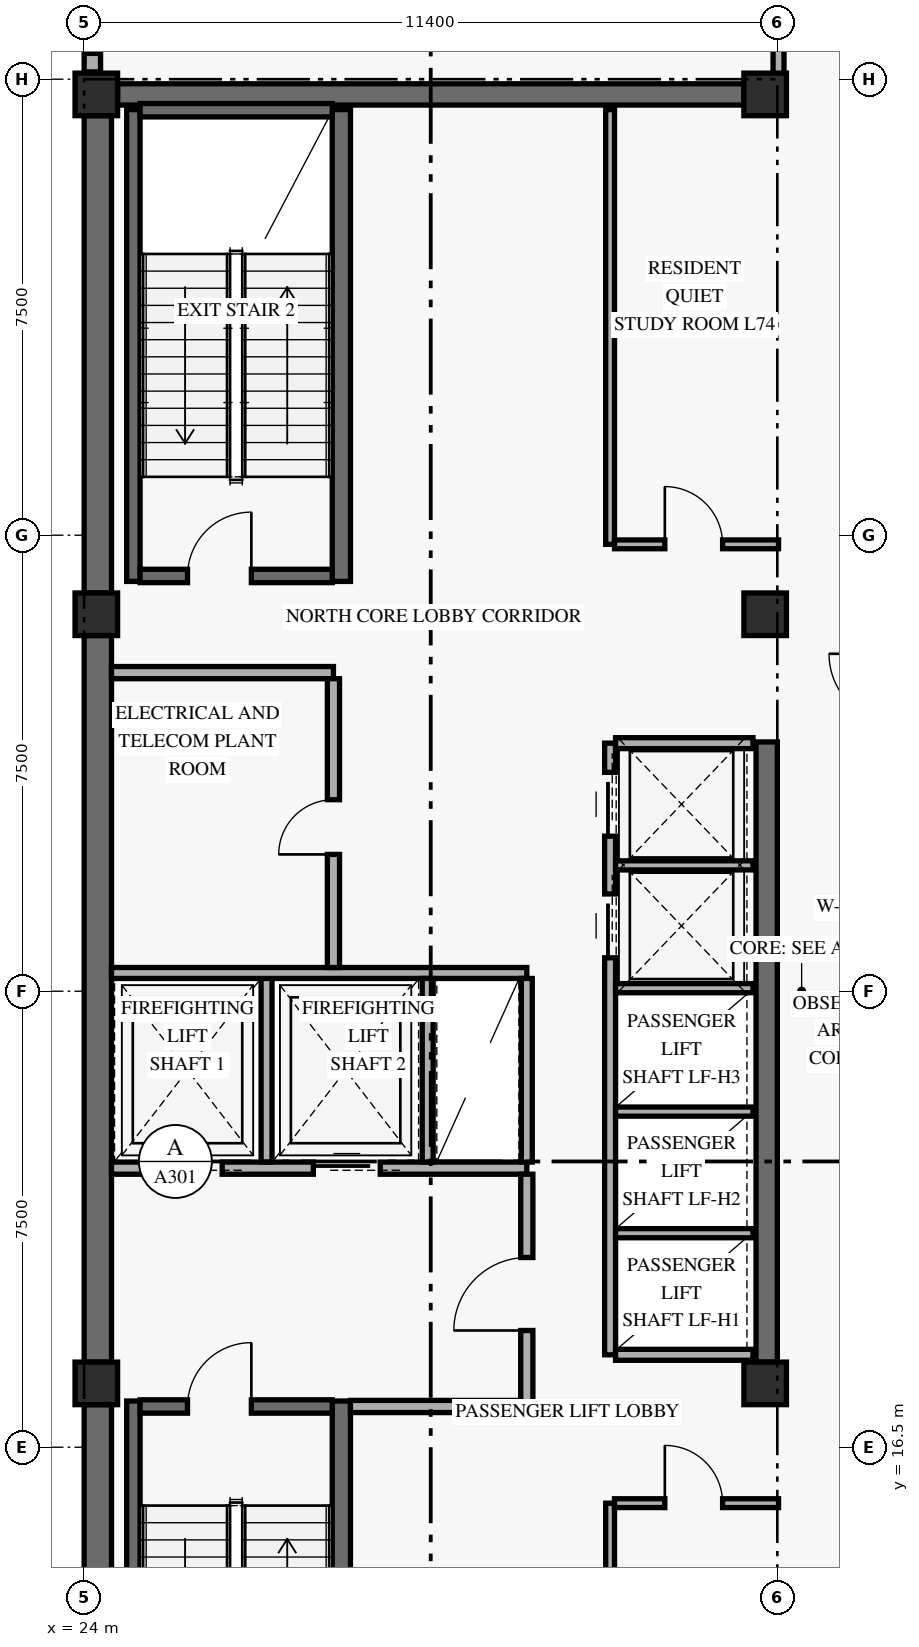
"""IFC4 building model, lengths in metres.
Left out: names, types, materials, properties, quantities, classifications, styles, units other than length and angle.
Written with IfcOpenShell. Run it as: python <this file> out.ifc"""

import sys

from ifc_helpers import new_model, si_unit, direction, frame, frame_2d, origin, origin_2d, place, context, subcontext, project, spatial, rectangle, extrude, element, fill, save


model = new_model("IFC4")
c1 = context("Model", 3, precision=1e-05, world=origin(), true_north=direction((0.0, 1.0)))
c2 = subcontext(c1, "Body", "Model", "MODEL_VIEW")
j1 = project(units=[si_unit("LENGTHUNIT", "METRE"), si_unit("PLANEANGLEUNIT", "RADIAN")], contexts=[c1])
p1 = place(None, origin())
s1 = spatial("IfcSite", under=j1, at=p1, CompositionType="ELEMENT")
p2 = place(p1, origin())
s2 = spatial("IfcBuilding", under=s1, at=p2, CompositionType="ELEMENT")
p3 = place(p2, frame((0.0, 0.0, 282.0)))
s3 = spatial("IfcBuildingStorey", under=s2, at=p3, CompositionType="ELEMENT", Elevation=282.0)
p4 = place(p3, frame((24.225, 9.6, 0.0), z_axis=(0.0, 0.0, 1.0), x_axis=(0.0, 1.0, 0.0)))
e1 = element("IfcWall", 1, at=p4, inside=s3, PredefinedType="SHEAR", context=c2, shape_type="SweptSolid", body=[
    extrude(rectangle(XDim=7.6, YDim=0.45, at=frame_2d((3.8, 0.0))), origin(), (0.0, 0.0, 1.0), 4.161),
])
p5 = place(p3, frame((24.225, 17.9, 0.0), z_axis=(0.0, 0.0, 1.0), x_axis=(0.0, 1.0, 0.0)))
e2 = element("IfcWall", 2, at=p5, inside=s3, PredefinedType="SHEAR", context=c2, shape_type="SweptSolid", body=[
    extrude(rectangle(XDim=11.95, YDim=0.45, at=frame_2d((5.975, 0.0))), origin(), (0.0, 0.0, 1.0), 4.161),
])
p6 = place(p3, frame((24.225, 30.55, 0.0), z_axis=(0.0, 0.0, 1.0), x_axis=(0.0, 1.0, 0.0)))
e3 = element("IfcWall", 3, at=p6, inside=s3, PredefinedType="SHEAR", context=c2, shape_type="SweptSolid", body=[
    extrude(rectangle(XDim=7.85, YDim=0.45, at=frame_2d((3.925, 0.0))), origin(), (0.0, 0.0, 1.0), 4.161),
])
p7 = place(p3, frame((35.225, 17.9, 0.0), z_axis=(0.0, 0.0, 1.0), x_axis=(0.0, 1.0, 0.0)))
e4 = element("IfcWall", 4, at=p7, inside=s3, PredefinedType="SHEAR", context=c2, shape_type="SweptSolid", body=[
    extrude(rectangle(XDim=10.2, YDim=0.35, at=frame_2d((5.1, 0.0))), origin(), (0.0, 0.0, 1.0), 4.161),
])
p8 = place(p3, frame((24.55, 38.75, 0.0), z_axis=(0.0, 0.0, 1.0), x_axis=(1.0, 0.0, 0.0)))
e5 = element("IfcWall", 5, at=p8, inside=s3, PredefinedType="SHEAR", context=c2, shape_type="SweptSolid", body=[
    extrude(rectangle(XDim=10.3, YDim=0.35, at=frame_2d((5.15, 0.0))), origin(), (0.0, 0.0, 1.0), 4.7),
])
p9 = place(p3, frame((24.81, 9.5, 0.0), z_axis=(0.0, 0.0, 1.0), x_axis=(0.0, 1.0, 0.0)))
e6 = element("IfcWall", 6, at=p9, inside=s3, PredefinedType="SHEAR", context=c2, shape_type="SweptSolid", body=[
    extrude(rectangle(XDim=7.76, YDim=0.22, at=frame_2d((3.88, 0.0))), origin(), (0.0, 0.0, 1.0), 4.7),
])
p10 = place(p3, frame((28.23, 9.5, 0.0), z_axis=(0.0, 0.0, 1.0), x_axis=(0.0, 1.0, 0.0)))
e7 = element("IfcWall", 7, at=p10, inside=s3, PredefinedType="SHEAR", context=c2, shape_type="SweptSolid", body=[
    extrude(rectangle(XDim=7.76, YDim=0.3, at=frame_2d((3.88, 0.0))), origin(), (0.0, 0.0, 1.0), 4.7),
])
p11 = place(p3, frame((24.92, 17.17, 0.0), z_axis=(0.0, 0.0, 1.0), x_axis=(1.0, 0.0, 0.0)))
e8 = element("IfcWall", 8, at=p11, inside=s3, PredefinedType="SHEAR", context=c2, shape_type="SweptSolid", body=[
    extrude(rectangle(XDim=3.16, YDim=0.22, at=frame_2d((1.58, 0.0))), origin(), (0.0, 0.0, 1.0), 4.7),
])
p12 = place(p11, frame((0.78, 0.0, 0.0)))
e9 = element("IfcOpeningElement", 9, at=p12, cuts=e8, PredefinedType="OPENING", context=c2, shape_type="SweptSolid", body=[
    extrude(rectangle(XDim=1.05, YDim=2.15, at=frame_2d((0.525, 1.075))), frame((0.0, 0.12, 0.0), z_axis=(0.0, -1.0, 0.0), x_axis=(1.0, 0.0, 0.0)), (0.0, 0.0, 1.0), 0.24),
])
p13 = place(p3, frame((24.81, 30.74, 0.0), z_axis=(0.0, 0.0, 1.0), x_axis=(0.0, 1.0, 0.0)))
e10 = element("IfcWall", 10, at=p13, inside=s3, PredefinedType="SHEAR", context=c2, shape_type="SweptSolid", body=[
    extrude(rectangle(XDim=7.76, YDim=0.22, at=frame_2d((3.88, 0.0))), origin(), (0.0, 0.0, 1.0), 4.7),
])
p14 = place(p3, frame((28.23, 30.74, 0.0), z_axis=(0.0, 0.0, 1.0), x_axis=(0.0, 1.0, 0.0)))
e11 = element("IfcWall", 11, at=p14, inside=s3, PredefinedType="SHEAR", context=c2, shape_type="SweptSolid", body=[
    extrude(rectangle(XDim=7.76, YDim=0.3, at=frame_2d((3.88, 0.0))), origin(), (0.0, 0.0, 1.0), 4.7),
])
p15 = place(p3, frame((24.92, 30.83, 0.0), z_axis=(0.0, 0.0, 1.0), x_axis=(1.0, 0.0, 0.0)))
e12 = element("IfcWall", 12, at=p15, inside=s3, PredefinedType="SHEAR", context=c2, shape_type="SweptSolid", body=[
    extrude(rectangle(XDim=3.16, YDim=0.22, at=frame_2d((1.58, 0.0))), origin(), (0.0, 0.0, 1.0), 4.7),
])
p16 = place(p15, frame((0.78, 0.0, 0.0)))
e13 = element("IfcOpeningElement", 13, at=p16, cuts=e12, PredefinedType="OPENING", context=c2, shape_type="SweptSolid", body=[
    extrude(rectangle(XDim=1.05, YDim=2.15, at=frame_2d((0.525, 1.075))), frame((0.0, 0.12, 0.0), z_axis=(0.0, -1.0, 0.0), x_axis=(1.0, 0.0, 0.0)), (0.0, 0.0, 1.0), 0.24),
])
p17 = place(p3, frame((24.92, 38.49, 0.0), z_axis=(0.0, 0.0, 1.0), x_axis=(1.0, 0.0, 0.0)))
e14 = element("IfcWall", 14, at=p17, inside=s3, PredefinedType="SHEAR", context=c2, shape_type="SweptSolid", body=[
    extrude(rectangle(XDim=3.16, YDim=0.22, at=frame_2d((1.58, 0.0))), origin(), (0.0, 0.0, 1.0), 4.7),
])
for number, where, z_axis, x_axis in (
    (15, (24.2, 17.55, 0.0), (0.0, 0.0, 1.0), (1.0, 0.0, 0.0)),
    (16, (24.2, 30.2, 0.0), (0.0, 0.0, 1.0), (1.0, 0.0, 0.0)),
    (17, (24.2, 38.75, 0.0), (0.0, 0.0, 1.0), (1.0, 0.0, 0.0)),
    (18, (35.2, 17.55, 0.0), (0.0, 0.0, 1.0), (1.0, 0.0, 0.0)),
    (19, (35.2, 30.2, 0.0), (0.0, 0.0, 1.0), (1.0, 0.0, 0.0)),
    (20, (35.2, 38.75, 0.0), (0.0, 0.0, 1.0), (1.0, 0.0, 0.0)),
):
    element("IfcColumn", number, at=place(p3, frame(where, z_axis=z_axis, x_axis=x_axis)), inside=s3, PredefinedType="COLUMN", context=c2, shape_type="SweptSolid", body=[
        extrude(rectangle(XDim=0.7, YDim=0.7, at=origin_2d()), origin(), (0.0, 0.0, 1.0), 5.0),
    ])
p18 = place(p3, frame((24.135, 39.12, 0.0), z_axis=(0.0, 0.0, 1.0), x_axis=(0.0, 1.0, 0.0)))
e21 = element("IfcWall", 21, at=p18, inside=s3, PredefinedType="SOLIDWALL", context=c2, shape_type="SweptSolid", body=[
    extrude(rectangle(XDim=1.56, YDim=0.27, at=frame_2d((0.78, 0.0))), origin(), (0.0, 0.0, 1.0), 4.143),
])
p19 = place(p18, frame((0.305, 0.0, 0.85)))
e22 = element("IfcOpeningElement", 22, at=p19, cuts=e21, PredefinedType="OPENING", context=c2, shape_type="SweptSolid", body=[
    extrude(rectangle(XDim=0.95, YDim=1.5, at=frame_2d((0.475, 0.75))), frame((0.0, 0.145, 0.0), z_axis=(0.0, -1.0, 0.0), x_axis=(1.0, 0.0, 0.0)), (0.0, 0.0, 1.0), 0.29),
])
p20 = place(p3, frame((24.45, 21.09, 0.0), z_axis=(0.0, 0.0, 1.0), x_axis=(1.0, 0.0, 0.0)))
e23 = element("IfcWall", 23, at=p20, inside=s3, PredefinedType="STANDARD", context=c2, shape_type="SweptSolid", body=[
    extrude(rectangle(XDim=6.83, YDim=0.2, at=frame_2d((3.415, 0.0))), origin(), (0.0, 0.0, 1.0), 4.7),
])
p21 = place(p20, frame((0.72, 0.0, 0.0)))
e24 = element("IfcOpeningElement", 24, at=p21, cuts=e23, PredefinedType="OPENING", context=c2, shape_type="SweptSolid", body=[
    extrude(rectangle(XDim=1.1, YDim=2.2, at=frame_2d((0.55, 1.1))), frame((0.0, 0.11, 0.0), z_axis=(0.0, -1.0, 0.0), x_axis=(1.0, 0.0, 0.0)), (0.0, 0.0, 1.0), 0.22),
])
p22 = place(p20, frame((3.32, 0.0, 0.0)))
e25 = element("IfcOpeningElement", 25, at=p22, cuts=e23, PredefinedType="OPENING", context=c2, shape_type="SweptSolid", body=[
    extrude(rectangle(XDim=1.1, YDim=2.2, at=frame_2d((0.55, 1.1))), frame((0.0, 0.11, 0.0), z_axis=(0.0, -1.0, 0.0), x_axis=(1.0, 0.0, 0.0)), (0.0, 0.0, 1.0), 0.22),
])
p23 = place(p3, frame((28.38, 17.17, 0.0), z_axis=(0.0, 0.0, 1.0), x_axis=(1.0, 0.0, 0.0)))
e26 = element("IfcWall", 26, at=p23, inside=s3, PredefinedType="STANDARD", context=c2, shape_type="SweptSolid", body=[
    extrude(rectangle(XDim=2.9, YDim=0.2, at=frame_2d((1.45, 0.0))), origin(), (0.0, 0.0, 1.0), 4.7),
])
p24 = place(p3, frame((31.28, 17.07, 0.0), z_axis=(0.0, 0.0, 1.0), x_axis=(0.0, 1.0, 0.0)))
e27 = element("IfcWall", 27, at=p24, inside=s3, PredefinedType="STANDARD", context=c2, shape_type="SweptSolid", body=[
    extrude(rectangle(XDim=3.92, YDim=0.2, at=frame_2d((1.96, 0.0))), origin(), (0.0, 0.0, 1.0), 4.143),
])
p25 = place(p24, frame((1.35, 0.0, 0.0)))
e28 = element("IfcOpeningElement", 28, at=p25, cuts=e27, PredefinedType="OPENING", context=c2, shape_type="SweptSolid", body=[
    extrude(rectangle(XDim=1.2, YDim=2.15, at=frame_2d((0.6, 1.075))), frame((0.0, 0.11, 0.0), z_axis=(0.0, -1.0, 0.0), x_axis=(1.0, 0.0, 0.0)), (0.0, 0.0, 1.0), 0.22),
])
p26 = place(p3, frame((27.0, 21.19, 0.0), z_axis=(0.0, 0.0, 1.0), x_axis=(0.0, 1.0, 0.0)))
e29 = element("IfcWall", 29, at=p26, inside=s3, PredefinedType="STANDARD", context=c2, shape_type="SweptSolid", body=[
    extrude(rectangle(XDim=3.11, YDim=0.18, at=frame_2d((1.555, 0.0))), origin(), (0.0, 0.0, 1.0), 4.7),
])
p27 = place(p3, frame((24.45, 24.3, 0.0), z_axis=(0.0, 0.0, 1.0), x_axis=(1.0, 0.0, 0.0)))
e30 = element("IfcWall", 30, at=p27, inside=s3, PredefinedType="STANDARD", context=c2, shape_type="SweptSolid", body=[
    extrude(rectangle(XDim=6.83, YDim=0.18, at=frame_2d((3.415, 0.0))), origin(), (0.0, 0.0, 1.0), 4.7),
])
for number, where, z_axis, x_axis in (
    (31, (29.65, 21.19, 0.0), (0.0, 0.0, 1.0), (0.0, 1.0, 0.0)),
    (32, (31.28, 21.19, 0.0), (0.0, 0.0, 1.0), (0.0, 1.0, 0.0)),
):
    element("IfcWall", number, at=place(p3, frame(where, z_axis=z_axis, x_axis=x_axis)), inside=s3, PredefinedType="STANDARD", context=c2, shape_type="SweptSolid", body=[
        extrude(rectangle(XDim=3.02, YDim=0.18, at=frame_2d((1.51, 0.0))), origin(), (0.0, 0.0, 1.0), 4.7),
    ])
p28 = place(p3, frame((24.45, 29.24, 0.0), z_axis=(0.0, 0.0, 1.0), x_axis=(1.0, 0.0, 0.0)))
e33 = element("IfcWall", 33, at=p28, inside=s3, PredefinedType="STANDARD", context=c2, shape_type="SweptSolid", body=[
    extrude(rectangle(XDim=3.65, YDim=0.2, at=frame_2d((1.825, 0.0))), origin(), (0.0, 0.0, 1.0), 4.7),
])
p29 = place(p3, frame((28.1, 24.39, 0.0), z_axis=(0.0, 0.0, 1.0), x_axis=(0.0, 1.0, 0.0)))
e34 = element("IfcWall", 34, at=p29, inside=s3, PredefinedType="STANDARD", context=c2, shape_type="SweptSolid", body=[
    extrude(rectangle(XDim=4.75, YDim=0.2, at=frame_2d((2.375, 0.0))), origin(), (0.0, 0.0, 1.0), 4.7),
])
p30 = place(p29, frame((1.86, 0.0, 0.0)))
e35 = element("IfcOpeningElement", 35, at=p30, cuts=e34, PredefinedType="OPENING", context=c2, shape_type="SweptSolid", body=[
    extrude(rectangle(XDim=0.9, YDim=2.1, at=frame_2d((0.45, 1.05))), frame((0.0, 0.11, 0.0), z_axis=(0.0, -1.0, 0.0), x_axis=(1.0, 0.0, 0.0)), (0.0, 0.0, 1.0), 0.22),
])
p31 = place(p3, frame((32.65, 18.02, 0.0), z_axis=(0.0, 0.0, 1.0), x_axis=(0.0, 1.0, 0.0)))
e36 = element("IfcWall", 36, at=p31, inside=s3, PredefinedType="STANDARD", context=c2, shape_type="SweptSolid", body=[
    extrude(rectangle(XDim=10.06, YDim=0.18, at=frame_2d((5.03, 0.0))), origin(), (0.0, 0.0, 1.0), 4.7),
])
p32 = place(p31, frame((6.53, 0.0, 0.0)))
e37 = element("IfcOpeningElement", 37, at=p32, cuts=e36, PredefinedType="OPENING", context=c2, shape_type="SweptSolid", body=[
    extrude(rectangle(XDim=1.05, YDim=2.2, at=frame_2d((0.525, 1.1))), frame((0.0, 0.1, 0.0), z_axis=(0.0, -1.0, 0.0), x_axis=(1.0, 0.0, 0.0)), (0.0, 0.0, 1.0), 0.2),
])
p33 = place(p31, frame((8.53, 0.0, 0.0)))
e38 = element("IfcOpeningElement", 38, at=p33, cuts=e36, PredefinedType="OPENING", context=c2, shape_type="SweptSolid", body=[
    extrude(rectangle(XDim=1.05, YDim=2.2, at=frame_2d((0.525, 1.1))), frame((0.0, 0.1, 0.0), z_axis=(0.0, -1.0, 0.0), x_axis=(1.0, 0.0, 0.0)), (0.0, 0.0, 1.0), 0.2),
])
for number, where, z_axis, x_axis in (
    (39, (32.74, 18.02, 0.0), (0.0, 0.0, 1.0), (1.0, 0.0, 0.0)),
    (40, (32.74, 28.08, 0.0), (0.0, 0.0, 1.0), (1.0, 0.0, 0.0)),
):
    element("IfcWall", number, at=place(p3, frame(where, z_axis=z_axis, x_axis=x_axis)), inside=s3, PredefinedType="STANDARD", context=c2, shape_type="SweptSolid", body=[
        extrude(rectangle(XDim=2.26, YDim=0.18, at=frame_2d((1.13, 0.0))), origin(), (0.0, 0.0, 1.0), 4.7),
    ])
for number, where, z_axis, x_axis in (
    (41, (32.74, 20.02, 0.0), (0.0, 0.0, 1.0), (1.0, 0.0, 0.0)),
    (42, (32.74, 22.02, 0.0), (0.0, 0.0, 1.0), (1.0, 0.0, 0.0)),
    (43, (32.74, 24.05, 0.0), (0.0, 0.0, 1.0), (1.0, 0.0, 0.0)),
    (44, (32.74, 26.07, 0.0), (0.0, 0.0, 1.0), (1.0, 0.0, 0.0)),
):
    element("IfcWall", number, at=place(p3, frame(where, z_axis=z_axis, x_axis=x_axis)), inside=s3, PredefinedType="STANDARD", context=c2, shape_type="SweptSolid", body=[
        extrude(rectangle(XDim=2.26, YDim=0.15, at=frame_2d((1.13, 0.0))), origin(), (0.0, 0.0, 1.0), 4.7),
    ])
p34 = place(p3, frame((35.42, 38.75, 0.0), z_axis=(0.0, 0.0, 1.0), x_axis=(0.0, 1.0, 0.0)))
e45 = element("IfcWall", 45, at=p34, inside=s3, PredefinedType="STANDARD", context=c2, shape_type="SweptSolid", body=[
    extrude(rectangle(XDim=3.48, YDim=0.18, at=frame_2d((1.74, 0.0))), origin(), (0.0, 0.0, 1.0), 4.143),
])
p35 = place(p34, frame((0.8, 0.0, 0.0)))
e46 = element("IfcOpeningElement", 46, at=p35, cuts=e45, PredefinedType="OPENING", context=c2, shape_type="SweptSolid", body=[
    extrude(rectangle(XDim=0.95, YDim=2.15, at=frame_2d((0.475, 1.075))), frame((0.0, 0.1, 0.0), z_axis=(0.0, -1.0, 0.0), x_axis=(1.0, 0.0, 0.0)), (0.0, 0.0, 1.0), 0.2),
])
p36 = place(p3, frame((32.65, 9.5, 0.0), z_axis=(0.0, 0.0, 1.0), x_axis=(0.0, 1.0, 0.0)))
e47 = element("IfcWall", 47, at=p36, inside=s3, PredefinedType="PARTITIONING", context=c2, shape_type="SweptSolid", body=[
    extrude(rectangle(XDim=6.08, YDim=0.145, at=frame_2d((3.04, 0.0))), origin(), (0.0, 0.0, 1.0), 4.7),
])
p37 = place(p3, frame((32.722, 15.58, 0.0), z_axis=(0.0, 0.0, 1.0), x_axis=(1.0, 0.0, 0.0)))
e48 = element("IfcWall", 48, at=p37, inside=s3, PredefinedType="PARTITIONING", context=c2, shape_type="SweptSolid", body=[
    extrude(rectangle(XDim=2.698, YDim=0.145, at=frame_2d((1.349, 0.0))), origin(), (0.0, 0.0, 1.0), 4.143),
])
p38 = place(p37, frame((0.827, 0.0, 0.0)))
e49 = element("IfcOpeningElement", 49, at=p38, cuts=e48, PredefinedType="OPENING", context=c2, shape_type="SweptSolid", body=[
    extrude(rectangle(XDim=0.95, YDim=2.15, at=frame_2d((0.475, 1.075))), frame((0.0, 0.083, 0.0), z_axis=(0.0, -1.0, 0.0), x_axis=(1.0, 0.0, 0.0)), (0.0, 0.0, 1.0), 0.165),
])
p39 = place(p3, frame((32.65, 31.35, 0.0), z_axis=(0.0, 0.0, 1.0), x_axis=(0.0, 1.0, 0.0)))
e50 = element("IfcWall", 50, at=p39, inside=s3, PredefinedType="PARTITIONING", context=c2, shape_type="SweptSolid", body=[
    extrude(rectangle(XDim=7.15, YDim=0.145, at=frame_2d((3.575, 0.0))), origin(), (0.0, 0.0, 1.0), 4.7),
])
p40 = place(p3, frame((32.722, 31.35, 0.0), z_axis=(0.0, 0.0, 1.0), x_axis=(1.0, 0.0, 0.0)))
e51 = element("IfcWall", 51, at=p40, inside=s3, PredefinedType="PARTITIONING", context=c2, shape_type="SweptSolid", body=[
    extrude(rectangle(XDim=2.698, YDim=0.145, at=frame_2d((1.349, 0.0))), origin(), (0.0, 0.0, 1.0), 4.143),
])
p41 = place(p40, frame((0.827, 0.0, 0.0)))
e52 = element("IfcOpeningElement", 52, at=p41, cuts=e51, PredefinedType="OPENING", context=c2, shape_type="SweptSolid", body=[
    extrude(rectangle(XDim=0.95, YDim=2.15, at=frame_2d((0.475, 1.075))), frame((0.0, 0.083, 0.0), z_axis=(0.0, -1.0, 0.0), x_axis=(1.0, 0.0, 0.0)), (0.0, 0.0, 1.0), 0.165),
])
p42 = place(p19, origin())
e53 = element("IfcWindow", 53, at=p42, inside=s3, PartitioningType="SINGLE_PANEL", PredefinedType="WINDOW", context=c2, shape_type="SweptSolid", body=[
    extrude(rectangle(XDim=0.95, YDim=1.5, at=frame_2d((0.475, 0.75))), frame((0.0, 0.03, 0.0), z_axis=(0.0, -1.0, 0.0), x_axis=(1.0, 0.0, 0.0)), (0.0, 0.0, 1.0), 0.06),
])
fill(e22, e53)
p43 = place(p12, frame((1.05, 0.0, 0.0), z_axis=(0.0, 0.0, 1.0), x_axis=(-1.0, 0.0, 0.0)))
e54 = element("IfcDoor", 54, at=p43, inside=s3, OperationType="SINGLE_SWING_LEFT", PredefinedType="DOOR", context=c2, shape_type="SweptSolid", body=[
    extrude(rectangle(XDim=1.05, YDim=2.15, at=frame_2d((0.525, 1.075))), frame((0.0, 0.025, 0.0), z_axis=(0.0, -1.0, 0.0), x_axis=(1.0, 0.0, 0.0)), (0.0, 0.0, 1.0), 0.05),
])
fill(e9, e54)
p44 = place(p16, origin())
e55 = element("IfcDoor", 55, at=p44, inside=s3, OperationType="SINGLE_SWING_RIGHT", PredefinedType="DOOR", context=c2, shape_type="SweptSolid", body=[
    extrude(rectangle(XDim=1.05, YDim=2.15, at=frame_2d((0.525, 1.075))), frame((0.0, 0.025, 0.0), z_axis=(0.0, -1.0, 0.0), x_axis=(1.0, 0.0, 0.0)), (0.0, 0.0, 1.0), 0.05),
])
fill(e13, e55)
p45 = place(p21, origin())
e56 = element("IfcDoor", 56, at=p45, inside=s3, OperationType="SLIDING_TO_LEFT", PredefinedType="DOOR", context=c2, shape_type="SweptSolid", body=[
    extrude(rectangle(XDim=1.1, YDim=2.2, at=frame_2d((0.55, 1.1))), frame((0.0, 0.025, 0.0), z_axis=(0.0, -1.0, 0.0), x_axis=(1.0, 0.0, 0.0)), (0.0, 0.0, 1.0), 0.05),
])
fill(e24, e56)
p46 = place(p22, origin())
e57 = element("IfcDoor", 57, at=p46, inside=s3, OperationType="SLIDING_TO_LEFT", PredefinedType="DOOR", context=c2, shape_type="SweptSolid", body=[
    extrude(rectangle(XDim=1.1, YDim=2.2, at=frame_2d((0.55, 1.1))), frame((0.0, 0.025, 0.0), z_axis=(0.0, -1.0, 0.0), x_axis=(1.0, 0.0, 0.0)), (0.0, 0.0, 1.0), 0.05),
])
fill(e25, e57)
p47 = place(p25, origin())
e58 = element("IfcDoor", 58, at=p47, inside=s3, OperationType="SINGLE_SWING_LEFT", PredefinedType="DOOR", context=c2, shape_type="SweptSolid", body=[
    extrude(rectangle(XDim=1.2, YDim=2.15, at=frame_2d((0.6, 1.075))), frame((0.0, 0.025, 0.0), z_axis=(0.0, -1.0, 0.0), x_axis=(1.0, 0.0, 0.0)), (0.0, 0.0, 1.0), 0.05),
])
fill(e28, e58)
p48 = place(p30, origin())
e59 = element("IfcDoor", 59, at=p48, inside=s3, OperationType="SINGLE_SWING_LEFT", PredefinedType="DOOR", context=c2, shape_type="SweptSolid", body=[
    extrude(rectangle(XDim=0.9, YDim=2.1, at=frame_2d((0.45, 1.05))), frame((0.0, 0.025, 0.0), z_axis=(0.0, -1.0, 0.0), x_axis=(1.0, 0.0, 0.0)), (0.0, 0.0, 1.0), 0.05),
])
fill(e35, e59)
p49 = place(p32, origin())
e60 = element("IfcDoor", 60, at=p49, inside=s3, OperationType="SLIDING_TO_LEFT", PredefinedType="DOOR", context=c2, shape_type="SweptSolid", body=[
    extrude(rectangle(XDim=1.05, YDim=2.2, at=frame_2d((0.525, 1.1))), frame((0.0, 0.025, 0.0), z_axis=(0.0, -1.0, 0.0), x_axis=(1.0, 0.0, 0.0)), (0.0, 0.0, 1.0), 0.05),
])
fill(e37, e60)
p50 = place(p33, origin())
e61 = element("IfcDoor", 61, at=p50, inside=s3, OperationType="SLIDING_TO_LEFT", PredefinedType="DOOR", context=c2, shape_type="SweptSolid", body=[
    extrude(rectangle(XDim=1.05, YDim=2.2, at=frame_2d((0.525, 1.1))), frame((0.0, 0.025, 0.0), z_axis=(0.0, -1.0, 0.0), x_axis=(1.0, 0.0, 0.0)), (0.0, 0.0, 1.0), 0.05),
])
fill(e38, e61)
p51 = place(p38, origin())
e62 = element("IfcDoor", 62, at=p51, inside=s3, OperationType="SINGLE_SWING_LEFT", PredefinedType="DOOR", context=c2, shape_type="SweptSolid", body=[
    extrude(rectangle(XDim=0.95, YDim=2.15, at=frame_2d((0.475, 1.075))), frame((0.0, 0.025, 0.0), z_axis=(0.0, -1.0, 0.0), x_axis=(1.0, 0.0, 0.0)), (0.0, 0.0, 1.0), 0.05),
])
fill(e49, e62)
p52 = place(p41, origin())
e63 = element("IfcDoor", 63, at=p52, inside=s3, OperationType="SINGLE_SWING_LEFT", PredefinedType="DOOR", context=c2, shape_type="SweptSolid", body=[
    extrude(rectangle(XDim=0.95, YDim=2.15, at=frame_2d((0.475, 1.075))), frame((0.0, 0.025, 0.0), z_axis=(0.0, -1.0, 0.0), x_axis=(1.0, 0.0, 0.0)), (0.0, 0.0, 1.0), 0.05),
])
fill(e52, e63)
save(model, sys.argv[1])
